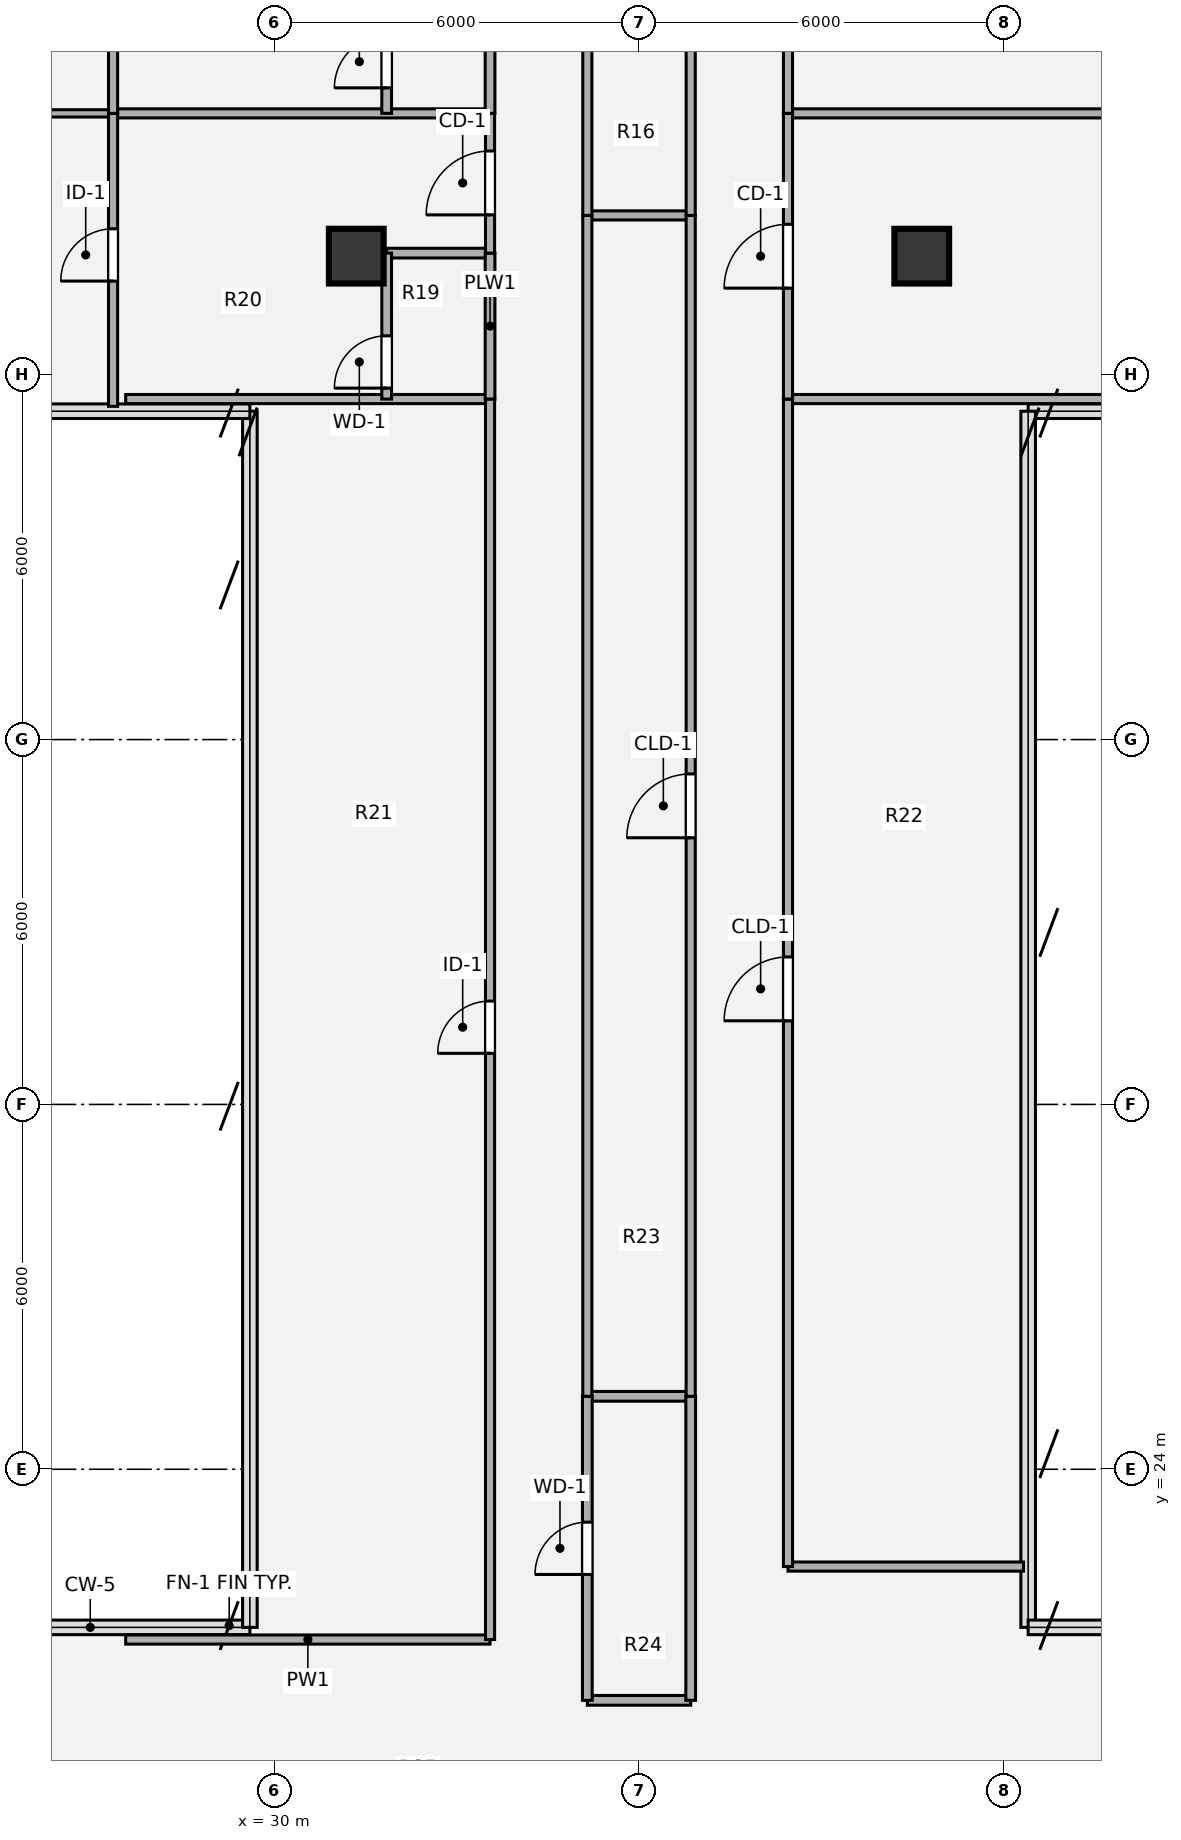
"""IFC4 building model, lengths in metres.
Left out: names, types, materials, properties, quantities, classifications, styles, units other than length and angle.
Written with IfcOpenShell. Run it as: python <this file> out.ifc"""

import sys

from ifc_helpers import new_model, si_unit, direction, frame, frame_2d, origin, origin_2d, place, context, subcontext, project, spatial, rectangle, hollow_circle, extrude, source, transform, mapped, element, fill, save


model = new_model("IFC4")
c1 = context("Model", 3, precision=1e-05, world=origin(), true_north=direction((0.0, 1.0)))
c2 = subcontext(c1, "Body", "Model", "MODEL_VIEW")
j1 = project(units=[si_unit("LENGTHUNIT", "METRE"), si_unit("PLANEANGLEUNIT", "RADIAN")], contexts=[c1])
p1 = place(None, origin())
s1 = spatial("IfcSite", under=j1, at=p1, CompositionType="ELEMENT")
p2 = place(p1, origin())
s2 = spatial("IfcBuilding", under=s1, at=p2, CompositionType="ELEMENT")
p3 = place(p2, frame((0.0, 0.0, 260.82)))
s3 = spatial("IfcBuildingStorey", under=s2, at=p3, CompositionType="ELEMENT", Elevation=260.82)
m1 = source(origin(), c2, "Body", "SweptSolid", [
    extrude(hollow_circle(Radius=0.45, WallThickness=0.032, at=origin_2d()), origin(), (0.0, 0.0, 1.0), 3.78),
])
for number, where, z_axis, x_axis in (
    (1, (31.35, 43.95, 0.0), (0.0, 0.0, 1.0), (1.0, 0.0, 0.0)),
    (2, (40.65, 43.95, 0.0), (0.0, 0.0, 1.0), (1.0, 0.0, 0.0)),
):
    element("IfcColumn", number, at=place(p3, frame(where, z_axis=z_axis, x_axis=x_axis)), inside=s3, PredefinedType="COLUMN", context=c2, shape_type="MappedRepresentation", body=[
        mapped(m1, transform((0.0, 0.0, 0.0), x_axis=(1.0, 0.0, 0.0), y_axis=(0.0, 1.0, 0.0), z_axis=(0.0, 0.0, 1.0), scale=1.0)),
    ])
p4 = place(p3, frame((35.15, 20.2, 0.0), z_axis=(0.0, 0.0, 1.0), x_axis=(1.0, 0.0, 0.0)))
e3 = element("IfcWall", 3, at=p4, inside=s3, PredefinedType="PLUMBINGWALL", context=c2, shape_type="SweptSolid", body=[
    extrude(rectangle(XDim=1.7, YDim=0.16, at=frame_2d((0.85, 0.0))), origin(), (0.0, 0.0, 1.0), 3.5),
])
p5 = place(p3, frame((27.558, 21.2, 0.0), z_axis=(0.0, 0.0, 1.0), x_axis=(1.0, 0.0, 0.0)))
e4 = element("IfcWall", 4, at=p5, inside=s3, PredefinedType="PARTITIONING", context=c2, shape_type="SweptSolid", body=[
    extrude(rectangle(XDim=5.992, YDim=0.15, at=frame_2d((2.996, 0.0))), origin(), (0.0, 0.0, 1.0), 3.5),
])
p6 = place(p3, frame((38.45, 22.4, 0.0), z_axis=(0.0, 0.0, 1.0), x_axis=(1.0, 0.0, 0.0)))
e5 = element("IfcWall", 5, at=p6, inside=s3, PredefinedType="PARTITIONING", context=c2, shape_type="SweptSolid", body=[
    extrude(rectangle(XDim=3.873, YDim=0.15, at=frame_2d((1.937, 0.0))), origin(), (0.0, 0.0, 1.0), 3.5),
])
p7 = place(p3, frame((35.15, 25.2, 0.0), z_axis=(0.0, 0.0, 1.0), x_axis=(1.0, 0.0, 0.0)))
e6 = element("IfcWall", 6, at=p7, inside=s3, PredefinedType="PLUMBINGWALL", context=c2, shape_type="SweptSolid", body=[
    extrude(rectangle(XDim=1.7, YDim=0.16, at=frame_2d((0.85, 0.0))), origin(), (0.0, 0.0, 1.0), 3.5),
])
p8 = place(p3, frame((27.558, 41.6, 0.0), z_axis=(0.0, 0.0, 1.0), x_axis=(1.0, 0.0, 0.0)))
e7 = element("IfcWall", 7, at=p8, inside=s3, PredefinedType="PARTITIONING", context=c2, shape_type="SweptSolid", body=[
    extrude(rectangle(XDim=5.992, YDim=0.15, at=frame_2d((2.996, 0.0))), origin(), (0.0, 0.0, 1.0), 3.5),
])
p9 = place(p3, frame((38.45, 41.6, 0.0), z_axis=(0.0, 0.0, 1.0), x_axis=(1.0, 0.0, 0.0)))
e8 = element("IfcWall", 8, at=p9, inside=s3, PredefinedType="PARTITIONING", context=c2, shape_type="SweptSolid", body=[
    extrude(rectangle(XDim=5.993, YDim=0.15, at=frame_2d((2.997, 0.0))), origin(), (0.0, 0.0, 1.0), 3.5),
])
p10 = place(p3, frame((31.85, 44.0, 0.0), z_axis=(0.0, 0.0, 1.0), x_axis=(1.0, 0.0, 0.0)))
e9 = element("IfcWall", 9, at=p10, inside=s3, PredefinedType="PLUMBINGWALL", context=c2, shape_type="SweptSolid", body=[
    extrude(rectangle(XDim=1.7, YDim=0.16, at=frame_2d((0.85, 0.0))), origin(), (0.0, 0.0, 1.0), 2.903),
])
p11 = place(p3, frame((35.15, 44.62, 0.0), z_axis=(0.0, 0.0, 1.0), x_axis=(1.0, 0.0, 0.0)))
e10 = element("IfcWall", 10, at=p11, inside=s3, PredefinedType="PARTITIONING", context=c2, shape_type="SweptSolid", body=[
    extrude(rectangle(XDim=1.7, YDim=0.15, at=frame_2d((0.85, 0.0))), origin(), (0.0, 0.0, 1.0), 3.259),
])
p12 = place(p3, frame((17.78, 46.298, 0.0), z_axis=(0.0, 0.0, 1.0), x_axis=(1.0, 0.0, 0.0)))
e11 = element("IfcWall", 11, at=p12, inside=s3, PredefinedType="PARTITIONING", context=c2, shape_type="SweptSolid", body=[
    extrude(rectangle(XDim=9.57, YDim=0.12, at=frame_2d((4.785, 0.0))), origin(), (0.0, 0.0, 1.0), 3.055),
])
p13 = place(p3, frame((27.35, 46.298, 0.0), z_axis=(0.0, 0.0, 1.0), x_axis=(1.0, 0.0, 0.0)))
e12 = element("IfcWall", 12, at=p13, inside=s3, PredefinedType="PARTITIONING", context=c2, shape_type="SweptSolid", body=[
    extrude(rectangle(XDim=6.2, YDim=0.15, at=frame_2d((3.1, 0.0))), origin(), (0.0, 0.0, 1.0), 3.055),
])
p14 = place(p3, frame((38.45, 46.298, 0.0), z_axis=(0.0, 0.0, 1.0), x_axis=(1.0, 0.0, 0.0)))
e13 = element("IfcWall", 13, at=p14, inside=s3, PredefinedType="PARTITIONING", context=c2, shape_type="SweptSolid", body=[
    extrude(rectangle(XDim=15.77, YDim=0.15, at=frame_2d((7.885, 0.0))), origin(), (0.0, 0.0, 1.0), 3.055),
])
p15 = place(p3, frame((27.35, 41.48, 0.0), z_axis=(0.0, 0.0, 1.0), x_axis=(0.0, 1.0, 0.0)))
e14 = element("IfcWall", 14, at=p15, inside=s3, PredefinedType="PARTITIONING", context=c2, shape_type="SweptSolid", body=[
    extrude(rectangle(XDim=4.818, YDim=0.15, at=frame_2d((2.409, 0.0))), origin(), (0.0, 0.0, 1.0), 3.5),
])
p16 = place(p15, frame((2.06, 0.0, 0.0)))
e15 = element("IfcOpeningElement", 15, at=p16, cuts=e14, PredefinedType="OPENING", context=c2, shape_type="SweptSolid", body=[
    extrude(rectangle(XDim=0.86, YDim=2.1, at=origin_2d()), frame((0.43, 0.085, 1.05), z_axis=(0.0, -1.0, 0.0), x_axis=(1.0, 0.0, 0.0)), (0.0, 0.0, 1.0), 0.17),
])
p17 = place(p3, frame((27.35, 46.298, 0.0), z_axis=(0.0, 0.0, 1.0), x_axis=(0.0, 1.0, 0.0)))
e16 = element("IfcWall", 16, at=p17, inside=s3, PredefinedType="PARTITIONING", context=c2, shape_type="SweptSolid", body=[
    extrude(rectangle(XDim=4.524, YDim=0.15, at=frame_2d((2.262, 0.0))), origin(), (0.0, 0.0, 1.0), 3.5),
])
p18 = place(p17, frame((1.742, 0.0, 0.0)))
e17 = element("IfcOpeningElement", 17, at=p18, cuts=e16, PredefinedType="OPENING", context=c2, shape_type="SweptSolid", body=[
    extrude(rectangle(XDim=0.86, YDim=2.1, at=origin_2d()), frame((0.43, 0.085, 1.05), z_axis=(0.0, -1.0, 0.0), x_axis=(1.0, 0.0, 0.0)), (0.0, 0.0, 1.0), 0.17),
])
p19 = place(p3, frame((31.85, 41.6, 0.0), z_axis=(0.0, 0.0, 1.0), x_axis=(0.0, 1.0, 0.0)))
e18 = element("IfcWall", 18, at=p19, inside=s3, PredefinedType="PLUMBINGWALL", context=c2, shape_type="SweptSolid", body=[
    extrude(rectangle(XDim=2.4, YDim=0.16, at=frame_2d((1.2, 0.0))), origin(), (0.0, 0.0, 1.0), 3.5),
])
p20 = place(p19, frame((0.18, 0.0, 0.0)))
e19 = element("IfcOpeningElement", 19, at=p20, cuts=e18, PredefinedType="OPENING", context=c2, shape_type="SweptSolid", body=[
    extrude(rectangle(XDim=0.86, YDim=2.1, at=origin_2d()), frame((0.43, 0.09, 1.05), z_axis=(0.0, -1.0, 0.0), x_axis=(1.0, 0.0, 0.0)), (0.0, 0.0, 1.0), 0.18),
])
p21 = place(p3, frame((31.85, 46.298, 0.0), z_axis=(0.0, 0.0, 1.0), x_axis=(0.0, 1.0, 0.0)))
e20 = element("IfcWall", 20, at=p21, inside=s3, PredefinedType="PLUMBINGWALL", context=c2, shape_type="SweptSolid", body=[
    extrude(rectangle(XDim=2.4, YDim=0.16, at=frame_2d((1.2, 0.0))), origin(), (0.0, 0.0, 1.0), 3.5),
])
p22 = place(p21, frame((0.42, 0.0, 0.0)))
e21 = element("IfcOpeningElement", 21, at=p22, cuts=e20, PredefinedType="OPENING", context=c2, shape_type="SweptSolid", body=[
    extrude(rectangle(XDim=0.86, YDim=2.1, at=origin_2d()), frame((0.43, 0.09, 1.05), z_axis=(0.0, -1.0, 0.0), x_axis=(1.0, 0.0, 0.0)), (0.0, 0.0, 1.0), 0.18),
])
p23 = place(p3, frame((33.55, 21.2, 0.0), z_axis=(0.0, 0.0, 1.0), x_axis=(0.0, 1.0, 0.0)))
e22 = element("IfcWall", 22, at=p23, inside=s3, PredefinedType="PARTITIONING", context=c2, shape_type="SweptSolid", body=[
    extrude(rectangle(XDim=20.4, YDim=0.15, at=frame_2d((10.2, 0.0))), origin(), (0.0, 0.0, 1.0), 3.5),
])
p24 = place(p23, frame((9.64, 0.0, 0.0)))
e23 = element("IfcOpeningElement", 23, at=p24, cuts=e22, PredefinedType="OPENING", context=c2, shape_type="SweptSolid", body=[
    extrude(rectangle(XDim=0.86, YDim=2.1, at=origin_2d()), frame((0.43, 0.085, 1.05), z_axis=(0.0, -1.0, 0.0), x_axis=(1.0, 0.0, 0.0)), (0.0, 0.0, 1.0), 0.17),
])
p25 = place(p3, frame((33.55, 41.6, 0.0), z_axis=(0.0, 0.0, 1.0), x_axis=(0.0, 1.0, 0.0)))
e24 = element("IfcWall", 24, at=p25, inside=s3, PredefinedType="PLUMBINGWALL", context=c2, shape_type="SweptSolid", body=[
    extrude(rectangle(XDim=2.4, YDim=0.16, at=frame_2d((1.2, 0.0))), origin(), (0.0, 0.0, 1.0), 3.5),
])
p26 = place(p3, frame((33.55, 44.0, 0.0), z_axis=(0.0, 0.0, 1.0), x_axis=(0.0, 1.0, 0.0)))
e25 = element("IfcWall", 25, at=p26, inside=s3, PredefinedType="PARTITIONING", context=c2, shape_type="SweptSolid", body=[
    extrude(rectangle(XDim=2.298, YDim=0.15, at=frame_2d((1.149, 0.0))), origin(), (0.0, 0.0, 1.0), 3.5),
])
p27 = place(p26, frame((0.629, 0.0, 0.0)))
e26 = element("IfcOpeningElement", 26, at=p27, cuts=e25, PredefinedType="OPENING", context=c2, shape_type="SweptSolid", body=[
    extrude(rectangle(XDim=1.05, YDim=2.1, at=origin_2d()), frame((0.525, 0.085, 1.05), z_axis=(0.0, -1.0, 0.0), x_axis=(1.0, 0.0, 0.0)), (0.0, 0.0, 1.0), 0.17),
])
p28 = place(p3, frame((33.55, 46.298, 0.0), z_axis=(0.0, 0.0, 1.0), x_axis=(0.0, 1.0, 0.0)))
e27 = element("IfcWall", 27, at=p28, inside=s3, PredefinedType="PLUMBINGWALL", context=c2, shape_type="SweptSolid", body=[
    extrude(rectangle(XDim=2.4, YDim=0.16, at=frame_2d((1.2, 0.0))), origin(), (0.0, 0.0, 1.0), 3.5),
])
p29 = place(p3, frame((35.15, 20.2, 0.0), z_axis=(0.0, 0.0, 1.0), x_axis=(0.0, 1.0, 0.0)))
e28 = element("IfcWall", 28, at=p29, inside=s3, PredefinedType="PLUMBINGWALL", context=c2, shape_type="SweptSolid", body=[
    extrude(rectangle(XDim=5.0, YDim=0.16, at=frame_2d((2.5, 0.0))), origin(), (0.0, 0.0, 1.0), 3.5),
])
p30 = place(p29, frame((2.07, 0.0, 0.0)))
e29 = element("IfcOpeningElement", 29, at=p30, cuts=e28, PredefinedType="OPENING", context=c2, shape_type="SweptSolid", body=[
    extrude(rectangle(XDim=0.86, YDim=2.1, at=origin_2d()), frame((0.43, 0.09, 1.05), z_axis=(0.0, -1.0, 0.0), x_axis=(1.0, 0.0, 0.0)), (0.0, 0.0, 1.0), 0.18),
])
p31 = place(p3, frame((35.15, 25.2, 0.0), z_axis=(0.0, 0.0, 1.0), x_axis=(0.0, 1.0, 0.0)))
e30 = element("IfcWall", 30, at=p31, inside=s3, PredefinedType="PARTITIONING", context=c2, shape_type="SweptSolid", body=[
    extrude(rectangle(XDim=19.42, YDim=0.15, at=frame_2d((9.71, 0.0))), origin(), (0.0, 0.0, 1.0), 3.5),
])
p32 = place(p3, frame((35.15, 44.62, 0.0), z_axis=(0.0, 0.0, 1.0), x_axis=(0.0, 1.0, 0.0)))
e31 = element("IfcWall", 31, at=p32, inside=s3, PredefinedType="PARTITIONING", context=c2, shape_type="SweptSolid", body=[
    extrude(rectangle(XDim=12.58, YDim=0.15, at=frame_2d((6.29, 0.0))), origin(), (0.0, 0.0, 1.0), 3.5),
])
p33 = place(p32, frame((5.83, 0.0, 0.0)))
e32 = element("IfcOpeningElement", 32, at=p33, cuts=e31, PredefinedType="OPENING", context=c2, shape_type="SweptSolid", body=[
    extrude(rectangle(XDim=0.86, YDim=2.1, at=origin_2d()), frame((0.43, 0.085, 1.05), z_axis=(0.0, -1.0, 0.0), x_axis=(1.0, 0.0, 0.0)), (0.0, 0.0, 1.0), 0.17),
])
p34 = place(p3, frame((36.85, 20.2, 0.0), z_axis=(0.0, 0.0, 1.0), x_axis=(0.0, 1.0, 0.0)))
e33 = element("IfcWall", 33, at=p34, inside=s3, PredefinedType="PLUMBINGWALL", context=c2, shape_type="SweptSolid", body=[
    extrude(rectangle(XDim=5.0, YDim=0.16, at=frame_2d((2.5, 0.0))), origin(), (0.0, 0.0, 1.0), 3.5),
])
p35 = place(p3, frame((36.85, 25.2, 0.0), z_axis=(0.0, 0.0, 1.0), x_axis=(0.0, 1.0, 0.0)))
e34 = element("IfcWall", 34, at=p35, inside=s3, PredefinedType="PARTITIONING", context=c2, shape_type="SweptSolid", body=[
    extrude(rectangle(XDim=19.42, YDim=0.15, at=frame_2d((9.71, 0.0))), origin(), (0.0, 0.0, 1.0), 3.5),
])
p36 = place(p35, frame((9.185, 0.0, 0.0)))
e35 = element("IfcOpeningElement", 35, at=p36, cuts=e34, PredefinedType="OPENING", context=c2, shape_type="SweptSolid", body=[
    extrude(rectangle(XDim=1.05, YDim=2.1, at=origin_2d()), frame((0.525, 0.085, 1.05), z_axis=(0.0, -1.0, 0.0), x_axis=(1.0, 0.0, 0.0)), (0.0, 0.0, 1.0), 0.17),
])
p37 = place(p3, frame((36.85, 44.62, 0.0), z_axis=(0.0, 0.0, 1.0), x_axis=(0.0, 1.0, 0.0)))
e36 = element("IfcWall", 36, at=p37, inside=s3, PredefinedType="PARTITIONING", context=c2, shape_type="SweptSolid", body=[
    extrude(rectangle(XDim=12.58, YDim=0.15, at=frame_2d((6.29, 0.0))), origin(), (0.0, 0.0, 1.0), 3.5),
])
p38 = place(p3, frame((38.45, 22.4, 0.0), z_axis=(0.0, 0.0, 1.0), x_axis=(0.0, 1.0, 0.0)))
e37 = element("IfcWall", 37, at=p38, inside=s3, PredefinedType="PARTITIONING", context=c2, shape_type="SweptSolid", body=[
    extrude(rectangle(XDim=19.2, YDim=0.15, at=frame_2d((9.6, 0.0))), origin(), (0.0, 0.0, 1.0), 3.5),
])
p39 = place(p38, frame((8.975, 0.0, 0.0)))
e38 = element("IfcOpeningElement", 38, at=p39, cuts=e37, PredefinedType="OPENING", context=c2, shape_type="SweptSolid", body=[
    extrude(rectangle(XDim=1.05, YDim=2.1, at=origin_2d()), frame((0.525, 0.085, 1.05), z_axis=(0.0, -1.0, 0.0), x_axis=(1.0, 0.0, 0.0)), (0.0, 0.0, 1.0), 0.17),
])
p40 = place(p3, frame((38.45, 41.6, 0.0), z_axis=(0.0, 0.0, 1.0), x_axis=(0.0, 1.0, 0.0)))
e39 = element("IfcWall", 39, at=p40, inside=s3, PredefinedType="PARTITIONING", context=c2, shape_type="SweptSolid", body=[
    extrude(rectangle(XDim=4.698, YDim=0.15, at=frame_2d((2.349, 0.0))), origin(), (0.0, 0.0, 1.0), 3.5),
])
p41 = place(p40, frame((1.824, 0.0, 0.0)))
e40 = element("IfcOpeningElement", 40, at=p41, cuts=e39, PredefinedType="OPENING", context=c2, shape_type="SweptSolid", body=[
    extrude(rectangle(XDim=1.05, YDim=2.1, at=origin_2d()), frame((0.525, 0.085, 1.05), z_axis=(0.0, -1.0, 0.0), x_axis=(1.0, 0.0, 0.0)), (0.0, 0.0, 1.0), 0.17),
])
p42 = place(p3, frame((38.45, 46.298, 0.0), z_axis=(0.0, 0.0, 1.0), x_axis=(0.0, 1.0, 0.0)))
e41 = element("IfcWall", 41, at=p42, inside=s3, PredefinedType="PARTITIONING", context=c2, shape_type="SweptSolid", body=[
    extrude(rectangle(XDim=4.524, YDim=0.15, at=frame_2d((2.262, 0.0))), origin(), (0.0, 0.0, 1.0), 3.5),
])
p43 = place(p42, frame((1.737, 0.0, 0.0)))
e42 = element("IfcOpeningElement", 42, at=p43, cuts=e41, PredefinedType="OPENING", context=c2, shape_type="SweptSolid", body=[
    extrude(rectangle(XDim=1.05, YDim=2.1, at=origin_2d()), frame((0.525, 0.085, 1.05), z_axis=(0.0, -1.0, 0.0), x_axis=(1.0, 0.0, 0.0)), (0.0, 0.0, 1.0), 0.17),
])
m2 = source(origin(), c2, "Body", "SweptSolid", [
    extrude(rectangle(XDim=0.86, YDim=2.1, at=origin_2d()), frame((0.43, 0.025, 1.05), z_axis=(0.0, -1.0, 0.0), x_axis=(1.0, 0.0, 0.0)), (0.0, 0.0, 1.0), 0.05),
])
p44 = place(p16, origin())
e43 = element("IfcDoor", 43, at=p44, inside=s3, OperationType="SINGLE_SWING_LEFT", PredefinedType="DOOR", context=c2, shape_type="MappedRepresentation", body=[
    mapped(m2, transform((0.0, 0.0, 0.0), x_axis=(1.0, 0.0, 0.0), y_axis=(0.0, 1.0, 0.0), z_axis=(0.0, 0.0, 1.0), scale=1.0)),
])
fill(e15, e43)
m3 = source(origin(), c2, "Body", "SweptSolid", [
    extrude(rectangle(XDim=0.86, YDim=2.1, at=origin_2d()), frame((0.43, 0.025, 1.05), z_axis=(0.0, -1.0, 0.0), x_axis=(1.0, 0.0, 0.0)), (0.0, 0.0, 1.0), 0.05),
])
p45 = place(p20, origin())
e44 = element("IfcDoor", 44, at=p45, inside=s3, OperationType="SINGLE_SWING_LEFT", PredefinedType="DOOR", context=c2, shape_type="MappedRepresentation", body=[
    mapped(m3, transform((0.0, 0.0, 0.0), x_axis=(1.0, 0.0, 0.0), y_axis=(0.0, 1.0, 0.0), z_axis=(0.0, 0.0, 1.0), scale=1.0)),
])
fill(e19, e44)
p46 = place(p22, origin())
e45 = element("IfcDoor", 45, at=p46, inside=s3, OperationType="SINGLE_SWING_LEFT", PredefinedType="DOOR", context=c2, shape_type="MappedRepresentation", body=[
    mapped(m3, transform((0.0, 0.0, 0.0), x_axis=(1.0, 0.0, 0.0), y_axis=(0.0, 1.0, 0.0), z_axis=(0.0, 0.0, 1.0), scale=1.0)),
])
fill(e21, e45)
p47 = place(p24, origin())
e46 = element("IfcDoor", 46, at=p47, inside=s3, OperationType="SINGLE_SWING_LEFT", PredefinedType="DOOR", context=c2, shape_type="MappedRepresentation", body=[
    mapped(m2, transform((0.0, 0.0, 0.0), x_axis=(1.0, 0.0, 0.0), y_axis=(0.0, 1.0, 0.0), z_axis=(0.0, 0.0, 1.0), scale=1.0)),
])
fill(e23, e46)
m4 = source(origin(), c2, "Body", "SweptSolid", [
    extrude(rectangle(XDim=1.05, YDim=2.1, at=origin_2d()), frame((0.525, 0.025, 1.05), z_axis=(0.0, -1.0, 0.0), x_axis=(1.0, 0.0, 0.0)), (0.0, 0.0, 1.0), 0.05),
])
p48 = place(p27, origin())
e47 = element("IfcDoor", 47, at=p48, inside=s3, OperationType="SINGLE_SWING_LEFT", PredefinedType="DOOR", context=c2, shape_type="MappedRepresentation", body=[
    mapped(m4, transform((0.0, 0.0, 0.0), x_axis=(1.0, 0.0, 0.0), y_axis=(0.0, 1.0, 0.0), z_axis=(0.0, 0.0, 1.0), scale=1.0)),
])
fill(e26, e47)
p49 = place(p30, origin())
e48 = element("IfcDoor", 48, at=p49, inside=s3, OperationType="SINGLE_SWING_LEFT", PredefinedType="DOOR", context=c2, shape_type="MappedRepresentation", body=[
    mapped(m3, transform((0.0, 0.0, 0.0), x_axis=(1.0, 0.0, 0.0), y_axis=(0.0, 1.0, 0.0), z_axis=(0.0, 0.0, 1.0), scale=1.0)),
])
fill(e29, e48)
m5 = source(origin(), c2, "Body", "SweptSolid", [
    extrude(rectangle(XDim=1.05, YDim=2.1, at=origin_2d()), frame((0.525, 0.025, 1.05), z_axis=(0.0, -1.0, 0.0), x_axis=(1.0, 0.0, 0.0)), (0.0, 0.0, 1.0), 0.05),
])
p50 = place(p36, origin())
e49 = element("IfcDoor", 49, at=p50, inside=s3, OperationType="SINGLE_SWING_LEFT", PredefinedType="DOOR", context=c2, shape_type="MappedRepresentation", body=[
    mapped(m5, transform((0.0, 0.0, 0.0), x_axis=(1.0, 0.0, 0.0), y_axis=(0.0, 1.0, 0.0), z_axis=(0.0, 0.0, 1.0), scale=1.0)),
])
fill(e35, e49)
p51 = place(p39, origin())
e50 = element("IfcDoor", 50, at=p51, inside=s3, OperationType="SINGLE_SWING_LEFT", PredefinedType="DOOR", context=c2, shape_type="MappedRepresentation", body=[
    mapped(m5, transform((0.0, 0.0, 0.0), x_axis=(1.0, 0.0, 0.0), y_axis=(0.0, 1.0, 0.0), z_axis=(0.0, 0.0, 1.0), scale=1.0)),
])
fill(e38, e50)
p52 = place(p41, origin())
e51 = element("IfcDoor", 51, at=p52, inside=s3, OperationType="SINGLE_SWING_LEFT", PredefinedType="DOOR", context=c2, shape_type="MappedRepresentation", body=[
    mapped(m4, transform((0.0, 0.0, 0.0), x_axis=(1.0, 0.0, 0.0), y_axis=(0.0, 1.0, 0.0), z_axis=(0.0, 0.0, 1.0), scale=1.0)),
])
fill(e40, e51)
save(model, sys.argv[1])
